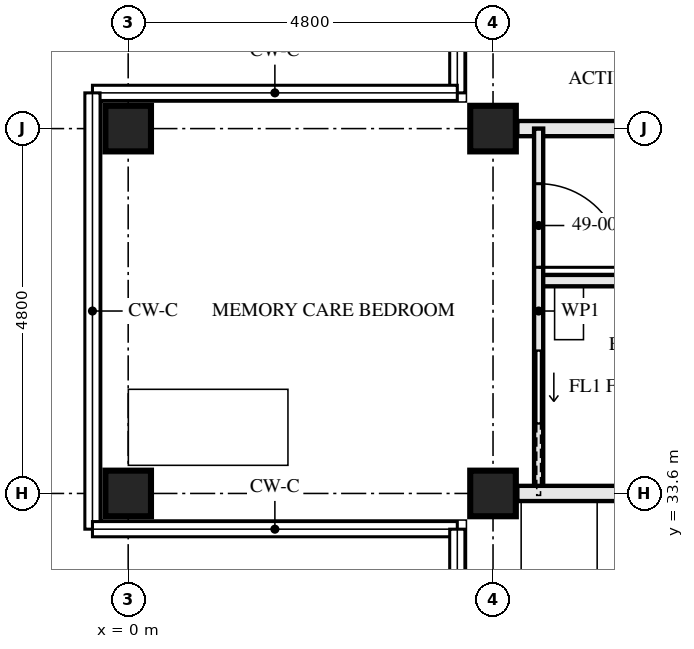
"""IFC4 building model, lengths in metres.
Left out: names, types, materials, properties, quantities, classifications, styles, units other than length and angle.
Written with IfcOpenShell. Run it as: python <this file> out.ifc"""

import sys

from ifc_helpers import new_model, si_unit, direction, frame, frame_2d, origin, origin_2d, place, context, subcontext, project, spatial, rectangle, hollow_rectangle, extrude, element, fill, save


model = new_model("IFC4")
c1 = context("Model", 3, precision=1e-05, world=origin(), true_north=direction((0.0, 1.0)))
c2 = subcontext(c1, "Body", "Model", "MODEL_VIEW")
j1 = project(units=[si_unit("LENGTHUNIT", "METRE"), si_unit("PLANEANGLEUNIT", "RADIAN")], contexts=[c1])
p1 = place(None, origin())
s1 = spatial("IfcSite", under=j1, at=p1, CompositionType="ELEMENT")
p2 = place(p1, origin())
s2 = spatial("IfcBuilding", under=s1, at=p2, CompositionType="ELEMENT")
p3 = place(p2, frame((0.0, 0.0, 179.5)))
s3 = spatial("IfcBuildingStorey", under=s2, at=p3, CompositionType="ELEMENT", Elevation=179.5)
for number, where, z_axis, x_axis in (
    (1, (0.0, 33.6, 0.0), (0.0, 0.0, 1.0), (0.0, 1.0, 0.0)),
    (2, (0.0, 38.4, 0.0), (0.0, 0.0, 1.0), (0.0, 1.0, 0.0)),
    (3, (4.8, 33.6, 0.0), (0.0, 0.0, 1.0), (0.0, 1.0, 0.0)),
    (4, (4.8, 38.4, 0.0), (0.0, 0.0, 1.0), (0.0, 1.0, 0.0)),
):
    element("IfcColumn", number, at=place(p3, frame(where, z_axis=z_axis, x_axis=x_axis)), inside=s3, PredefinedType="COLUMN", context=c2, shape_type="SweptSolid", body=[
        extrude(hollow_rectangle(XDim=0.6, YDim=0.6, WallThickness=0.08, at=origin_2d()), origin(), (0.0, 0.0, 1.0), 3.5),
    ])
p4 = place(p3, frame((5.12, 38.4, 0.0), z_axis=(0.0, 0.0, 1.0), x_axis=(1.0, 0.0, 0.0)))
e5 = element("IfcWall", 5, at=p4, inside=s3, PredefinedType="PARTITIONING", context=c2, shape_type="SweptSolid", body=[
    extrude(rectangle(XDim=7.28, YDim=0.2, at=frame_2d((3.64, 0.0))), origin(), (0.0, 0.0, 1.0), 2.55),
])
p5 = place(p3, frame((5.4, 36.4, 0.0), z_axis=(0.0, 0.0, 1.0), x_axis=(1.0, 0.0, 0.0)))
e6 = element("IfcWall", 6, at=p5, inside=s3, PredefinedType="PARTITIONING", context=c2, shape_type="SweptSolid", body=[
    extrude(rectangle(XDim=3.0, YDim=0.15, at=frame_2d((1.5, 0.0))), origin(), (0.0, 0.0, 1.0), 3.33),
])
p6 = place(p3, frame((5.4, 38.4, 0.0), z_axis=(0.0, 0.0, 1.0), x_axis=(0.0, -1.0, 0.0)))
e7 = element("IfcWall", 7, at=p6, inside=s3, PredefinedType="PARTITIONING", context=c2, shape_type="SweptSolid", body=[
    extrude(rectangle(XDim=4.8, YDim=0.12, at=frame_2d((2.4, 0.0))), origin(), (0.0, 0.0, 1.0), 3.33),
])
p7 = place(p6, frame((0.725, 0.0, 0.0)))
e8 = element("IfcOpeningElement", 8, at=p7, cuts=e7, PredefinedType="OPENING", context=c2, shape_type="SweptSolid", body=[
    extrude(rectangle(XDim=1.1, YDim=2.1, at=frame_2d((0.55, 1.05))), frame((0.0, 0.071, 0.0), z_axis=(0.0, -1.0, 0.0), x_axis=(1.0, 0.0, 0.0)), (0.0, 0.0, 1.0), 0.141),
])
p8 = place(p6, frame((2.925, 0.0, 0.0)))
e9 = element("IfcOpeningElement", 9, at=p8, cuts=e7, PredefinedType="OPENING", context=c2, shape_type="SweptSolid", body=[
    extrude(rectangle(XDim=0.95, YDim=2.1, at=frame_2d((0.475, 1.05))), frame((0.0, 0.071, 0.0), z_axis=(0.0, -1.0, 0.0), x_axis=(1.0, 0.0, 0.0)), (0.0, 0.0, 1.0), 0.141),
])
p9 = place(p3, frame((5.12, 33.6, 0.0), z_axis=(0.0, 0.0, 1.0), x_axis=(1.0, 0.0, 0.0)))
e10 = element("IfcWall", 10, at=p9, inside=s3, PredefinedType="PARTITIONING", context=c2, shape_type="SweptSolid", body=[
    extrude(rectangle(XDim=7.28, YDim=0.2, at=frame_2d((3.64, 0.0))), origin(), (0.0, 0.0, 1.0), 2.55),
])
p10 = place(p7, origin())
e11 = element("IfcDoor", 11, at=p10, inside=s3, OperationType="SINGLE_SWING_LEFT", PredefinedType="DOOR", context=c2, shape_type="SweptSolid", body=[
    extrude(rectangle(XDim=1.1, YDim=2.1, at=frame_2d((0.55, 1.05))), frame((0.0, 0.022, 0.0), z_axis=(0.0, -1.0, 0.0), x_axis=(1.0, 0.0, 0.0)), (0.0, 0.0, 1.0), 0.044),
])
fill(e8, e11)
p11 = place(p8, origin())
e12 = element("IfcDoor", 12, at=p11, inside=s3, OperationType="SLIDING_TO_LEFT", PredefinedType="DOOR", context=c2, shape_type="SweptSolid", body=[
    extrude(rectangle(XDim=0.95, YDim=2.1, at=frame_2d((0.475, 1.05))), frame((0.0, 0.022, 0.0), z_axis=(0.0, -1.0, 0.0), x_axis=(1.0, 0.0, 0.0)), (0.0, 0.0, 1.0), 0.044),
])
fill(e9, e12)
save(model, sys.argv[1])
